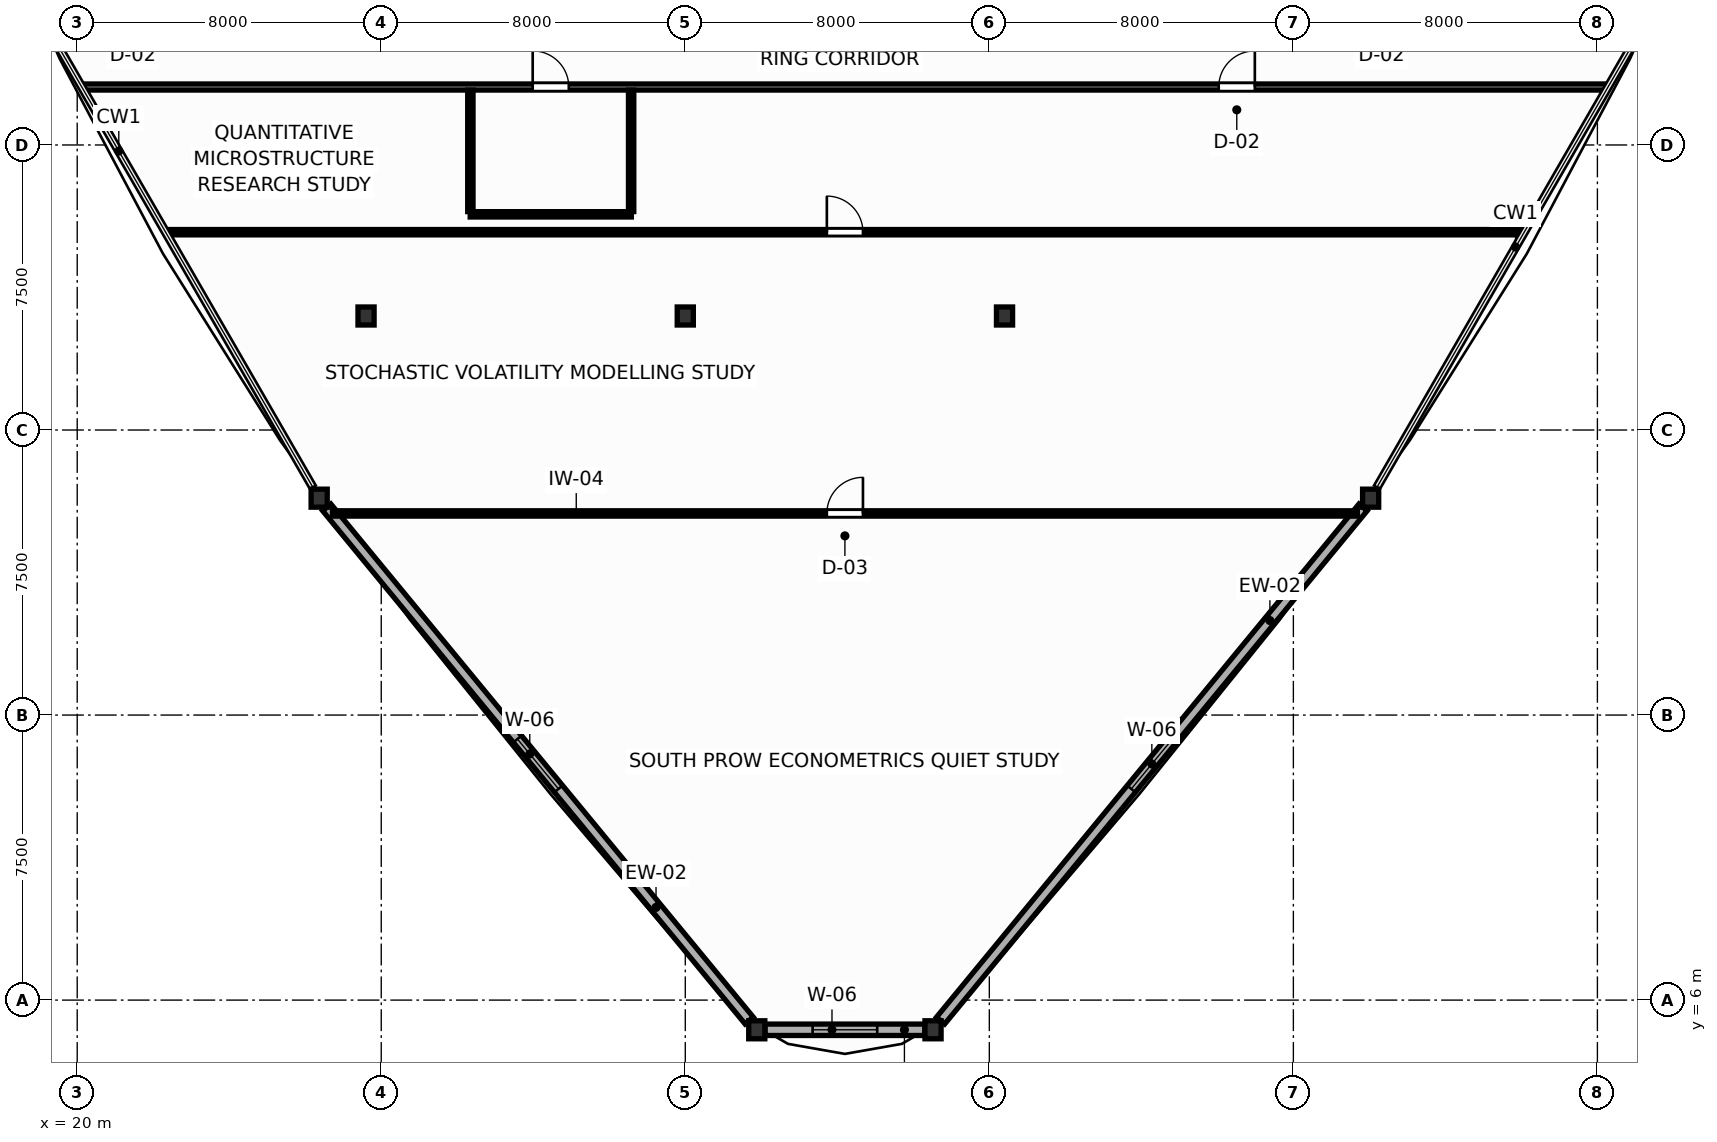
"""IFC4 building model, lengths in metres.
Left out: names, types, materials, properties, quantities, classifications, styles, units other than length and angle.
Written with IfcOpenShell. Run it as: python <this file> out.ifc"""

import sys

from ifc_helpers import new_model, si_unit, direction, frame, frame_2d, origin, origin_2d, place, context, subcontext, project, spatial, rectangle, i_section, extrude, source, transform, mapped, element, fill, save


model = new_model("IFC4")
c1 = context("Model", 3, precision=1e-05, world=origin(), true_north=direction((0.0, 1.0)))
c2 = subcontext(c1, "Body", "Model", "MODEL_VIEW")
j1 = project(units=[si_unit("LENGTHUNIT", "METRE"), si_unit("PLANEANGLEUNIT", "RADIAN")], contexts=[c1])
p1 = place(None, origin())
s1 = spatial("IfcSite", under=j1, at=p1, CompositionType="ELEMENT")
p2 = place(p1, origin())
s2 = spatial("IfcBuilding", under=s1, at=p2, CompositionType="ELEMENT")
p3 = place(p2, frame((0.0, 0.0, 71.7)))
s3 = spatial("IfcBuildingStorey", under=s2, at=p3, CompositionType="ELEMENT", Elevation=71.7)
m1 = source(origin(), c2, "Body", "SweptSolid", [
    extrude(i_section(OverallWidth=0.424, OverallDepth=0.474, WebThickness=0.045, FlangeThickness=0.072, FilletRadius=0.015, at=origin_2d()), origin(), (0.0, 0.0, 1.0), 3.9),
])
for number, where, z_axis, x_axis in (
    (1, (27.6, 24.0, 0.0), (0.0, 0.0, 1.0), (1.0, 0.0, 0.0)),
    (2, (44.4, 24.0, 0.0), (0.0, 0.0, 1.0), (1.0, 0.0, 0.0)),
    (3, (36.0, 24.0, 0.0), (0.0, 0.0, 1.0), (1.0, 0.0, 0.0)),
    (4, (26.367, 19.207, 0.0), (0.0, 0.0, 1.0), (1.0, 0.0, 0.0)),
    (5, (37.881, 5.219, 0.0), (0.0, 0.0, 1.0), (1.0, 0.0, 0.0)),
    (6, (42.519, 5.219, 0.0), (0.0, 0.0, 1.0), (1.0, 0.0, 0.0)),
    (7, (54.033, 19.207, 0.0), (0.0, 0.0, 1.0), (1.0, 0.0, 0.0)),
):
    element("IfcColumn", number, at=place(p3, frame(where, z_axis=z_axis, x_axis=x_axis)), inside=s3, PredefinedType="COLUMN", context=c2, shape_type="MappedRepresentation", body=[
        mapped(m1, transform((0.0, 0.0, 0.0), scale=1.0)),
    ])
p4 = place(p3, frame((26.566, 18.965, 0.0), z_axis=(0.0, 0.0, 1.0), x_axis=(0.635547248194, -0.772061976342, 0.0)))
e8 = element("IfcWall", 8, at=p4, inside=s3, PredefinedType="SOLIDWALL", context=c2, shape_type="SweptSolid", body=[
    extrude(rectangle(XDim=17.49, YDim=0.28, at=frame_2d((8.745, 0.0))), origin(), (0.0, 0.0, 1.0), 2.08),
])
p5 = place(p4, frame((7.895, 0.0, 0.75)))
e9 = element("IfcOpeningElement", 9, at=p5, cuts=e8, PredefinedType="OPENING", context=c2, shape_type="SweptSolid", body=[
    extrude(rectangle(XDim=1.7, YDim=1.15, at=frame_2d((0.85, 0.575))), frame((0.0, 0.15, 0.0), z_axis=(0.0, -1.0, 0.0), x_axis=(1.0, 0.0, 0.0)), (0.0, 0.0, 1.0), 0.3),
])
p6 = place(p3, frame((38.098, 5.219, 0.0), z_axis=(0.0, 0.0, 1.0), x_axis=(1.0, 0.0, 0.0)))
e10 = element("IfcWall", 10, at=p6, inside=s3, PredefinedType="SOLIDWALL", context=c2, shape_type="SweptSolid", body=[
    extrude(rectangle(XDim=4.204, YDim=0.3, at=frame_2d((2.102, 0.0))), origin(), (0.0, 0.0, 1.0), 2.08),
])
p7 = place(p6, frame((1.252, 0.0, 0.75)))
e11 = element("IfcOpeningElement", 11, at=p7, cuts=e10, PredefinedType="OPENING", context=c2, shape_type="SweptSolid", body=[
    extrude(rectangle(XDim=1.7, YDim=1.15, at=frame_2d((0.85, 0.575))), frame((0.0, 0.16, 0.0), z_axis=(0.0, -1.0, 0.0), x_axis=(1.0, 0.0, 0.0)), (0.0, 0.0, 1.0), 0.32),
])
p8 = place(p3, frame((42.718, 5.461, 0.0), z_axis=(0.0, 0.0, 1.0), x_axis=(0.635547248194, 0.772061976342, 0.0)))
e12 = element("IfcWall", 12, at=p8, inside=s3, PredefinedType="SOLIDWALL", context=c2, shape_type="SweptSolid", body=[
    extrude(rectangle(XDim=17.49, YDim=0.28, at=frame_2d((8.745, 0.0))), origin(), (0.0, 0.0, 1.0), 2.08),
])
p9 = place(p8, frame((7.895, 0.0, 0.75)))
e13 = element("IfcOpeningElement", 13, at=p9, cuts=e12, PredefinedType="OPENING", context=c2, shape_type="SweptSolid", body=[
    extrude(rectangle(XDim=1.7, YDim=1.15, at=frame_2d((0.85, 0.575))), frame((0.0, 0.15, 0.0), z_axis=(0.0, -1.0, 0.0), x_axis=(1.0, 0.0, 0.0)), (0.0, 0.0, 1.0), 0.3),
])
p10 = place(p3, frame((20.141, 30.025, 0.0), z_axis=(0.0, 0.0, 1.0), x_axis=(1.0, 0.0, 0.0)))
e14 = element("IfcWall", 14, at=p10, inside=s3, PredefinedType="PARTITIONING", context=c2, shape_type="SweptSolid", body=[
    extrude(rectangle(XDim=40.119, YDim=0.16, at=frame_2d((20.06, 0.0))), origin(), (0.0, 0.0, 1.0), 3.68),
])
p11 = place(p10, frame((11.844, 0.0, 0.0)))
e15 = element("IfcOpeningElement", 15, at=p11, cuts=e14, PredefinedType="OPENING", context=c2, shape_type="SweptSolid", body=[
    extrude(rectangle(XDim=0.95, YDim=2.05, at=frame_2d((0.475, 1.025))), frame((0.0, 0.09, 0.0), z_axis=(0.0, -1.0, 0.0), x_axis=(1.0, 0.0, 0.0)), (0.0, 0.0, 1.0), 0.18),
])
p12 = place(p10, frame((29.896, 0.0, 0.0)))
e16 = element("IfcOpeningElement", 16, at=p12, cuts=e14, PredefinedType="OPENING", context=c2, shape_type="SweptSolid", body=[
    extrude(rectangle(XDim=0.95, YDim=2.05, at=frame_2d((0.475, 1.025))), frame((0.0, 0.09, 0.0), z_axis=(0.0, -1.0, 0.0), x_axis=(1.0, 0.0, 0.0)), (0.0, 0.0, 1.0), 0.18),
])
p13 = place(p3, frame((22.346, 26.205, 0.0), z_axis=(0.0, 0.0, 1.0), x_axis=(1.0, 0.0, 0.0)))
e17 = element("IfcWall", 17, at=p13, inside=s3, PredefinedType="PARTITIONING", context=c2, shape_type="SweptSolid", body=[
    extrude(rectangle(XDim=35.708, YDim=0.14, at=frame_2d((17.854, 0.0))), origin(), (0.0, 0.0, 1.0), 3.68),
])
p14 = place(p13, frame((17.379, 0.0, 0.0)))
e18 = element("IfcOpeningElement", 18, at=p14, cuts=e17, PredefinedType="OPENING", context=c2, shape_type="SweptSolid", body=[
    extrude(rectangle(XDim=0.95, YDim=2.05, at=frame_2d((0.475, 1.025))), frame((0.0, 0.08, 0.0), z_axis=(0.0, -1.0, 0.0), x_axis=(1.0, 0.0, 0.0)), (0.0, 0.0, 1.0), 0.16),
])
p15 = place(p3, frame((26.717, 18.805, 0.0), z_axis=(0.0, 0.0, 1.0), x_axis=(1.0, 0.0, 0.0)))
e19 = element("IfcWall", 19, at=p15, inside=s3, PredefinedType="PARTITIONING", context=c2, shape_type="SweptSolid", body=[
    extrude(rectangle(XDim=26.965, YDim=0.14, at=frame_2d((13.483, 0.0))), origin(), (0.0, 0.0, 1.0), 3.68),
])
p16 = place(p15, frame((13.008, 0.0, 0.0)))
e20 = element("IfcOpeningElement", 20, at=p16, cuts=e19, PredefinedType="OPENING", context=c2, shape_type="SweptSolid", body=[
    extrude(rectangle(XDim=0.95, YDim=2.05, at=frame_2d((0.475, 1.025))), frame((0.0, 0.08, 0.0), z_axis=(0.0, -1.0, 0.0), x_axis=(1.0, 0.0, 0.0)), (0.0, 0.0, 1.0), 0.16),
])
p17 = place(p3, frame((30.34, 26.675, 0.0), z_axis=(0.0, 0.0, 1.0), x_axis=(1.0, 0.0, 0.0)))
e21 = element("IfcWall", 21, at=p17, inside=s3, PredefinedType="PARTITIONING", context=c2, shape_type="SweptSolid", body=[
    extrude(rectangle(XDim=4.24, YDim=0.14, at=frame_2d((2.12, 0.0))), origin(), (0.0, 0.0, 1.0), 3.68),
])
for number, where, z_axis, x_axis in (
    (22, (34.575, 26.747, 0.0), (0.0, 0.0, 1.0), (0.0, 1.0, 0.0)),
    (23, (30.345, 26.747, 0.0), (0.0, 0.0, 1.0), (0.0, 1.0, 0.0)),
):
    element("IfcWall", number, at=place(p3, frame(where, z_axis=z_axis, x_axis=x_axis)), inside=s3, PredefinedType="PARTITIONING", context=c2, shape_type="SweptSolid", body=[
        extrude(rectangle(XDim=3.196, YDim=0.14, at=frame_2d((1.598, 0.0))), origin(), (0.0, 0.0, 1.0), 3.68),
    ])
p18 = place(p5, origin())
e24 = element("IfcWindow", 24, at=p18, inside=s3, PartitioningType="SINGLE_PANEL", PredefinedType="WINDOW", context=c2, shape_type="SweptSolid", body=[
    extrude(rectangle(XDim=1.7, YDim=1.15, at=frame_2d((0.85, 0.575))), frame((0.0, 0.03, 0.0), z_axis=(0.0, -1.0, 0.0), x_axis=(1.0, 0.0, 0.0)), (0.0, 0.0, 1.0), 0.06),
])
fill(e9, e24)
p19 = place(p7, origin())
e25 = element("IfcWindow", 25, at=p19, inside=s3, PartitioningType="SINGLE_PANEL", PredefinedType="WINDOW", context=c2, shape_type="SweptSolid", body=[
    extrude(rectangle(XDim=1.7, YDim=1.15, at=frame_2d((0.85, 0.575))), frame((0.0, 0.03, 0.0), z_axis=(0.0, -1.0, 0.0), x_axis=(1.0, 0.0, 0.0)), (0.0, 0.0, 1.0), 0.06),
])
fill(e11, e25)
p20 = place(p9, origin())
e26 = element("IfcWindow", 26, at=p20, inside=s3, PartitioningType="SINGLE_PANEL", PredefinedType="WINDOW", context=c2, shape_type="SweptSolid", body=[
    extrude(rectangle(XDim=1.7, YDim=1.15, at=frame_2d((0.85, 0.575))), frame((0.0, 0.03, 0.0), z_axis=(0.0, -1.0, 0.0), x_axis=(1.0, 0.0, 0.0)), (0.0, 0.0, 1.0), 0.06),
])
fill(e13, e26)
p21 = place(p11, origin())
e27 = element("IfcDoor", 27, at=p21, inside=s3, OperationType="SINGLE_SWING_LEFT", PredefinedType="DOOR", context=c2, shape_type="SweptSolid", body=[
    extrude(rectangle(XDim=0.95, YDim=2.05, at=frame_2d((0.475, 1.025))), frame((0.0, 0.025, 0.0), z_axis=(0.0, -1.0, 0.0), x_axis=(1.0, 0.0, 0.0)), (0.0, 0.0, 1.0), 0.05),
])
fill(e15, e27)
p22 = place(p12, origin())
e28 = element("IfcDoor", 28, at=p22, inside=s3, OperationType="SINGLE_SWING_RIGHT", PredefinedType="DOOR", context=c2, shape_type="SweptSolid", body=[
    extrude(rectangle(XDim=0.95, YDim=2.05, at=frame_2d((0.475, 1.025))), frame((0.0, 0.025, 0.0), z_axis=(0.0, -1.0, 0.0), x_axis=(1.0, 0.0, 0.0)), (0.0, 0.0, 1.0), 0.05),
])
fill(e16, e28)
p23 = place(p14, origin())
e29 = element("IfcDoor", 29, at=p23, inside=s3, OperationType="SINGLE_SWING_LEFT", PredefinedType="DOOR", context=c2, shape_type="SweptSolid", body=[
    extrude(rectangle(XDim=0.95, YDim=2.05, at=frame_2d((0.475, 1.025))), frame((0.0, 0.025, 0.0), z_axis=(0.0, -1.0, 0.0), x_axis=(1.0, 0.0, 0.0)), (0.0, 0.0, 1.0), 0.05),
])
fill(e18, e29)
p24 = place(p16, origin())
e30 = element("IfcDoor", 30, at=p24, inside=s3, OperationType="SINGLE_SWING_RIGHT", PredefinedType="DOOR", context=c2, shape_type="SweptSolid", body=[
    extrude(rectangle(XDim=0.95, YDim=2.05, at=frame_2d((0.475, 1.025))), frame((0.0, 0.025, 0.0), z_axis=(0.0, -1.0, 0.0), x_axis=(1.0, 0.0, 0.0)), (0.0, 0.0, 1.0), 0.05),
])
fill(e20, e30)
save(model, sys.argv[1])
